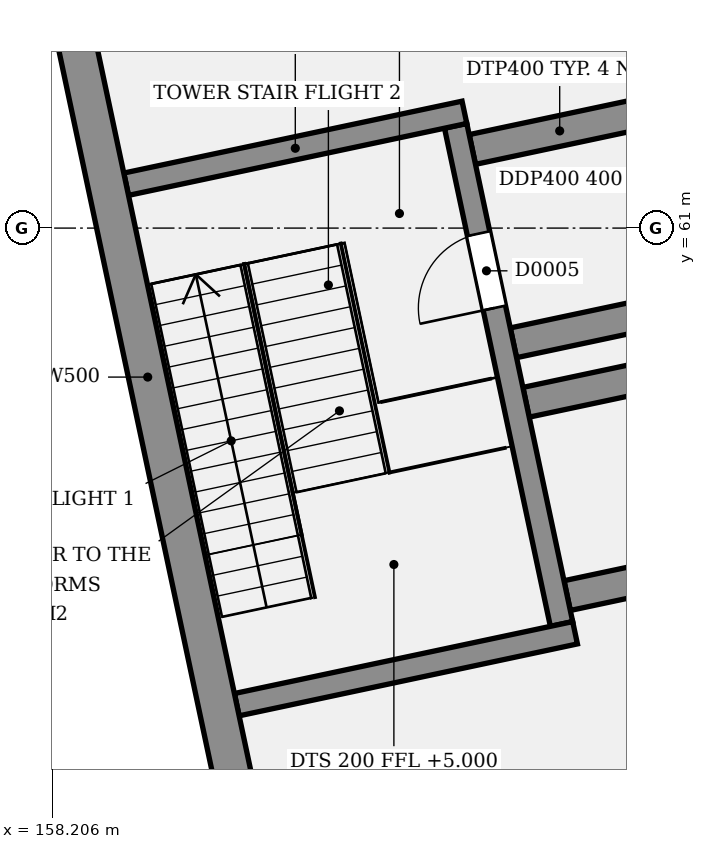
"""IFC4 building model, lengths in metres.
Left out: names, types, materials, properties, quantities, classifications, styles, units other than length and angle.
Written with IfcOpenShell. Run it as: python <this file> out.ifc"""

import sys

from ifc_helpers import new_model, si_unit, direction, frame, frame_2d, origin, place, context, subcontext, project, spatial, rectangle, extrude, element, fill, save


model = new_model("IFC4")
c1 = context("Model", 3, precision=1e-05, world=origin(), true_north=direction((0.0, 1.0)))
c2 = subcontext(c1, "Body", "Model", "MODEL_VIEW")
j1 = project(units=[si_unit("LENGTHUNIT", "METRE"), si_unit("PLANEANGLEUNIT", "RADIAN")], contexts=[c1])
p1 = place(None, origin())
s1 = spatial("IfcSite", under=j1, at=p1, CompositionType="ELEMENT")
p2 = place(p1, origin())
s2 = spatial("IfcBuilding", under=s1, at=p2, CompositionType="ELEMENT")
p3 = place(p2, origin())
s3 = spatial("IfcBuildingStorey", under=s2, at=p3, CompositionType="ELEMENT", Elevation=0.0)
p4 = place(p3, frame((170.289, 49.218, -5.0), z_axis=(0.0, 0.0, 1.0), x_axis=(-0.207912733899, 0.978147379019, 0.0)))
e1 = element("IfcWall", 1, at=p4, inside=s3, PredefinedType="SOLIDWALL", context=c2, shape_type="SweptSolid", body=[
    extrude(rectangle(XDim=21.8, YDim=0.4, at=frame_2d((10.9, 0.0))), origin(), (0.0, 0.0, 1.0), 5.0),
])
p5 = place(p3, frame((160.632, 54.73, 0.0), z_axis=(0.0, 0.0, 1.0), x_axis=(0.978144256617, 0.207927423029, 0.0)))
e2 = element("IfcWall", 2, at=p5, inside=s3, PredefinedType="SOLIDWALL", context=c2, shape_type="SweptSolid", body=[
    extrude(rectangle(XDim=4.55, YDim=0.3, at=frame_2d((2.275, 0.0))), origin(), (0.0, 0.0, 1.0), 5.0),
])
p6 = place(p3, frame((159.177, 61.577, 0.0), z_axis=(0.0, 0.0, 1.0), x_axis=(0.978146576304, 0.207916510322, 0.0)))
e3 = element("IfcWall", 3, at=p6, inside=s3, PredefinedType="SOLIDWALL", context=c2, shape_type="SweptSolid", body=[
    extrude(rectangle(XDim=4.55, YDim=0.3, at=frame_2d((2.275, 0.0))), origin(), (0.0, 0.0, 1.0), 5.0),
])
p7 = place(p3, frame((164.905, 55.792, 0.0), z_axis=(0.0, 0.0, 1.0), x_axis=(-0.207888827103, 0.978152460287, 0.0)))
e4 = element("IfcWall", 4, at=p7, inside=s3, PredefinedType="SOLIDWALL", context=c2, shape_type="SweptSolid", body=[
    extrude(rectangle(XDim=6.7, YDim=0.3, at=frame_2d((3.35, 0.0))), origin(), (0.0, 0.0, 1.0), 5.0),
])
p8 = place(p7, frame((4.25, 0.0, 3.0)))
e5 = element("IfcOpeningElement", 5, at=p8, cuts=e4, PredefinedType="OPENING", context=c2, shape_type="SweptSolid", body=[
    extrude(rectangle(XDim=1.0, YDim=2.0, at=frame_2d((0.5, 1.0))), frame((0.0, 0.16, 0.0), z_axis=(0.0, -1.0, 0.0), x_axis=(1.0, 0.0, 0.0)), (0.0, 0.0, 1.0), 0.32),
])
for number, where, z_axis, x_axis in (
    (6, (164.979, 56.165, 0.0), (0.0, 0.0, 1.0), (0.978, 0.208, 0.0)),
    (7, (164.438, 58.708, 0.0), (0.0, 0.0, 1.0), (0.978, 0.208, 0.0)),
):
    element("IfcWall", number, at=place(p3, frame(where, z_axis=z_axis, x_axis=x_axis)), inside=s3, PredefinedType="SOLIDWALL", context=c2, shape_type="SweptSolid", body=[
        extrude(rectangle(XDim=2.75, YDim=0.4, at=frame_2d((1.375, 0.0))), origin(), (0.0, 0.0, 1.0), 5.0),
    ])
for number, where, z_axis, x_axis in (
    (8, (163.731, 62.034, 0.0), (0.0, 0.0, 1.0), (0.978, 0.208, 0.0)),
    (9, (164.272, 59.491, 0.0), (0.0, 0.0, 1.0), (0.978, 0.208, 0.0)),
):
    element("IfcWall", number, at=place(p3, frame(where, z_axis=z_axis, x_axis=x_axis)), inside=s3, PredefinedType="SOLIDWALL", context=c2, shape_type="SweptSolid", body=[
        extrude(rectangle(XDim=2.35, YDim=0.4, at=frame_2d((1.175, 0.0))), origin(), (0.0, 0.0, 1.0), 5.0),
    ])
p9 = place(p3, frame((163.194, 41.473, 0.0), z_axis=(0.0, 0.0, 1.0), x_axis=(-0.20790710573, 0.978148575313, 0.0)))
e10 = element("IfcWall", 10, at=p9, inside=s3, PredefinedType="SOLIDWALL", context=c2, shape_type="SweptSolid", body=[
    extrude(rectangle(XDim=34.0, YDim=0.5, at=frame_2d((17.0, 0.0))), origin(), (0.0, 0.0, 1.0), 5.0),
])
p10 = place(p9, frame((28.3, 0.0, 0.0)))
e11 = element("IfcOpeningElement", 11, at=p10, cuts=e10, PredefinedType="OPENING", context=c2, shape_type="SweptSolid", body=[
    extrude(rectangle(XDim=1.8, YDim=2.4, at=frame_2d((0.9, 1.2))), frame((0.0, 0.26, 0.0), z_axis=(0.0, -1.0, 0.0), x_axis=(1.0, 0.0, 0.0)), (0.0, 0.0, 1.0), 0.52),
])
p11 = place(p8, origin())
e12 = element("IfcDoor", 12, at=p11, inside=s3, OperationType="SINGLE_SWING_LEFT", PredefinedType="DOOR", context=c2, shape_type="SweptSolid", body=[
    extrude(rectangle(XDim=1.0, YDim=2.0, at=frame_2d((0.5, 1.0))), frame((0.0, 0.025, 0.0), z_axis=(0.0, -1.0, 0.0), x_axis=(1.0, 0.0, 0.0)), (0.0, 0.0, 1.0), 0.05),
])
fill(e5, e12)
save(model, sys.argv[1])
